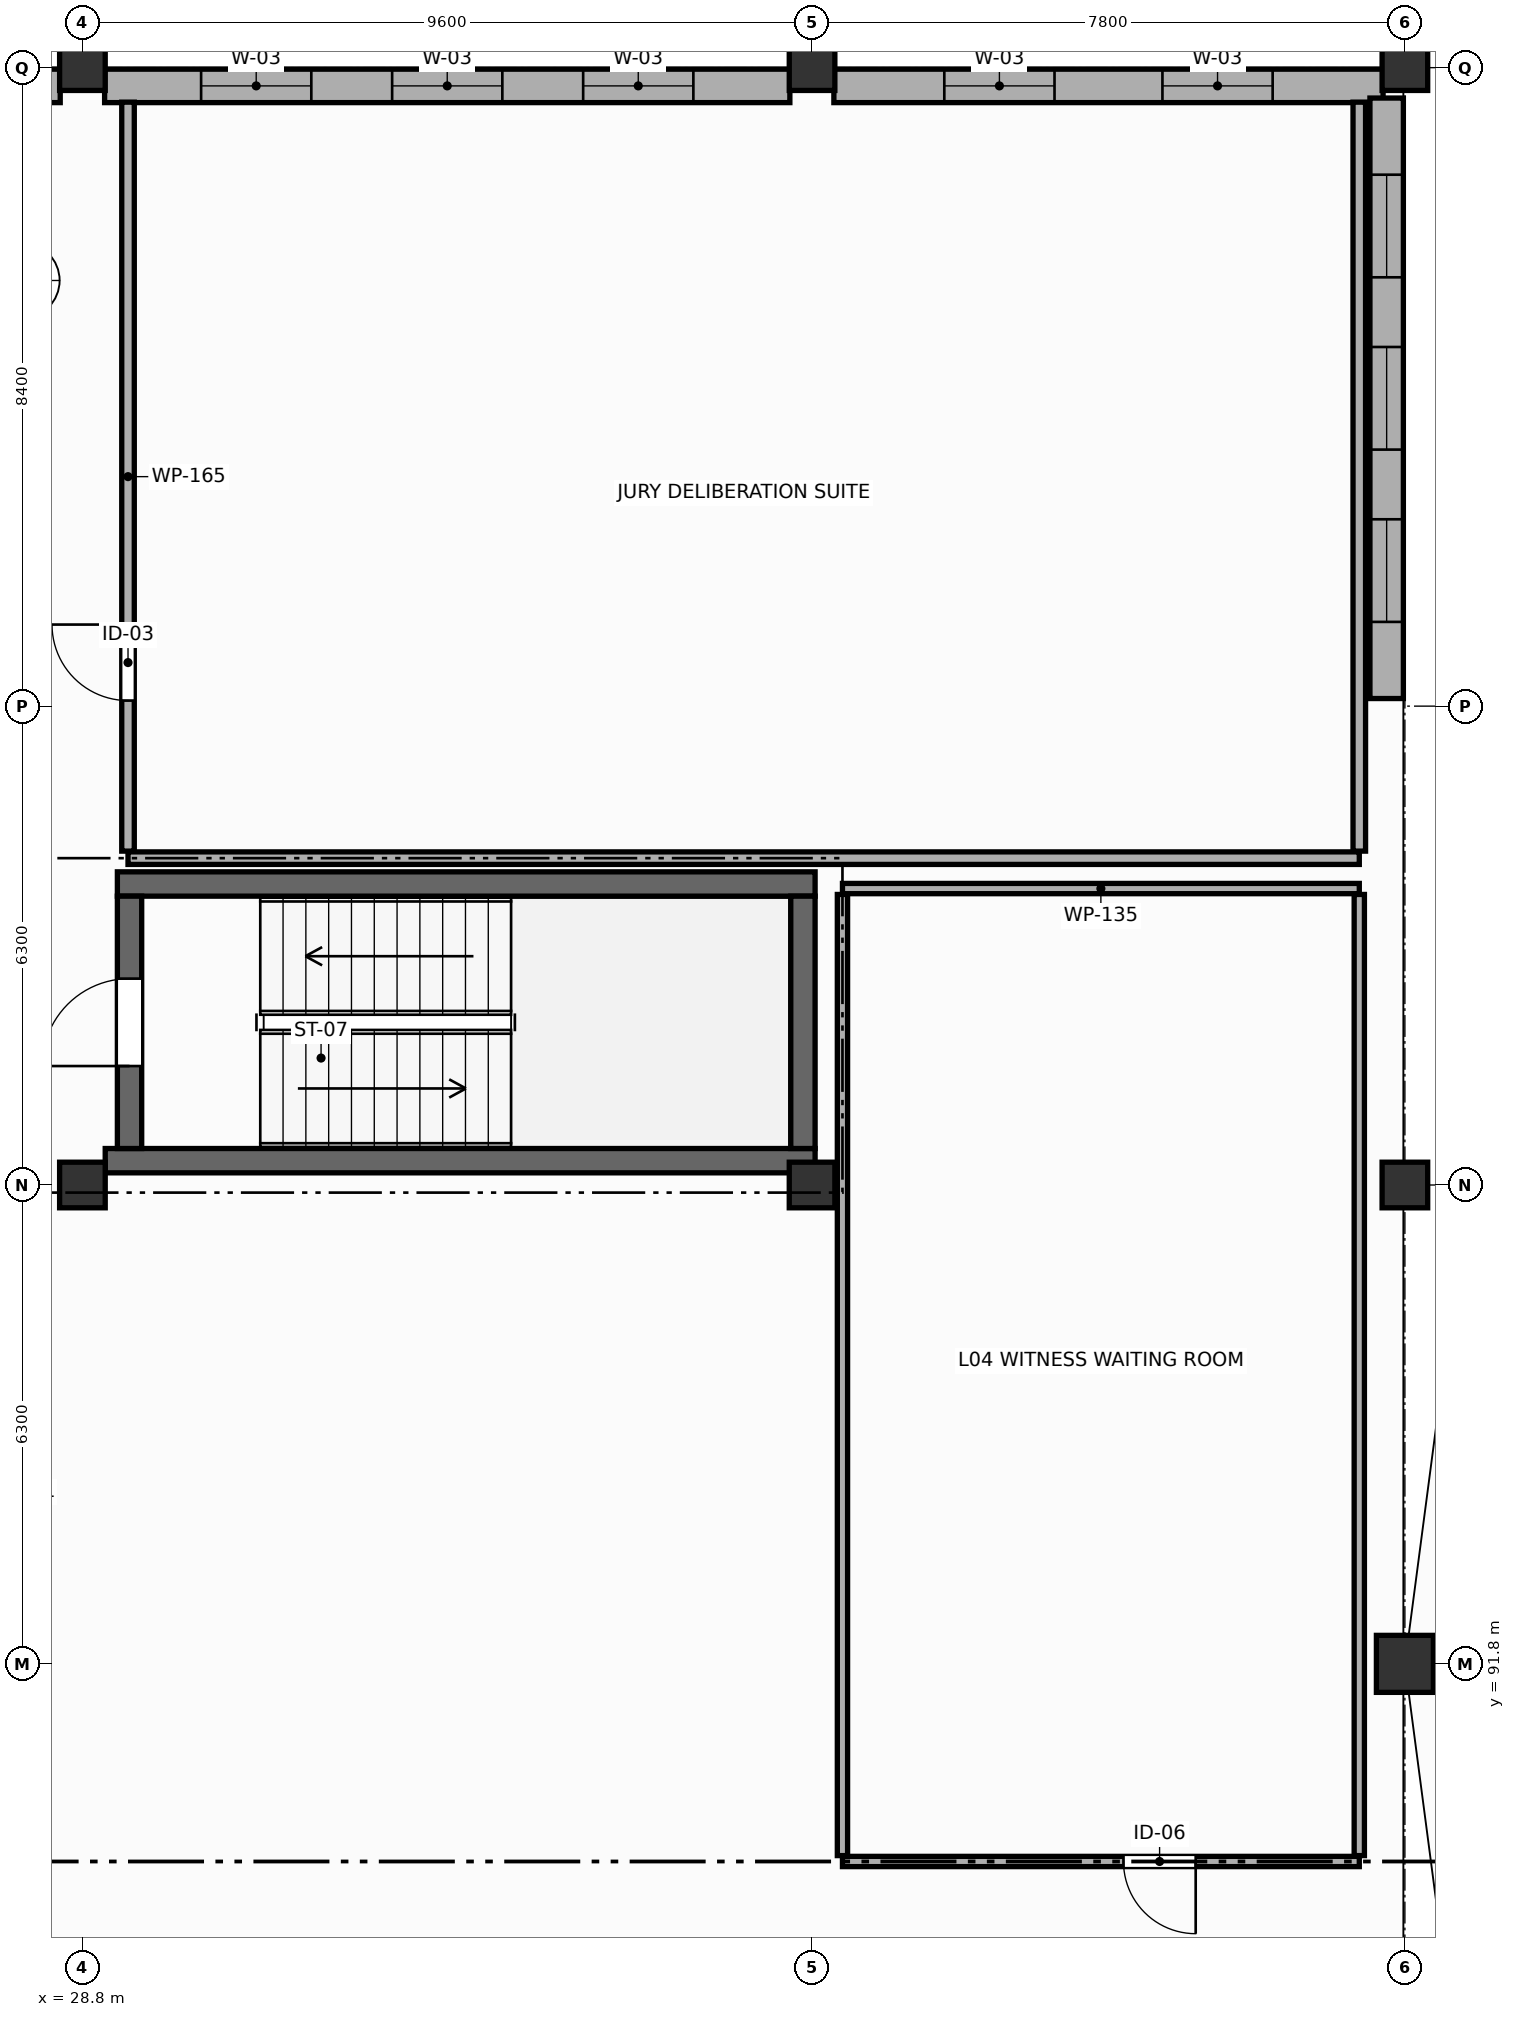
"""IFC4 building model, lengths in metres.
Left out: names, types, materials, properties, quantities, classifications, styles, units other than length and angle.
Written with IfcOpenShell. Run it as: python <this file> out.ifc"""

import sys

from ifc_helpers import new_model, si_unit, direction, frame, frame_2d, origin, origin_2d, place, context, subcontext, project, spatial, rectangle, circle, extrude, element, fill, save


model = new_model("IFC4")
c1 = context("Model", 3, precision=1e-05, world=origin(), true_north=direction((0.0, 1.0)))
c2 = subcontext(c1, "Body", "Model", "MODEL_VIEW")
j1 = project(units=[si_unit("LENGTHUNIT", "METRE"), si_unit("PLANEANGLEUNIT", "RADIAN")], contexts=[c1])
p1 = place(None, origin())
s1 = spatial("IfcSite", under=j1, at=p1, CompositionType="ELEMENT")
p2 = place(p1, origin())
s2 = spatial("IfcBuilding", under=s1, at=p2, CompositionType="ELEMENT")
p3 = place(p2, frame((0.0, 0.0, 14.4)))
s3 = spatial("IfcBuildingStorey", under=s2, at=p3, CompositionType="ELEMENT", Elevation=14.4)
p4 = place(p3, frame((46.2, 91.8, 0.0), z_axis=(0.0, 0.0, 1.0), x_axis=(1.0, 0.0, 0.0)))
e1 = element("IfcColumn", 1, at=p4, inside=s3, PredefinedType="COLUMN", context=c2, shape_type="SweptSolid", body=[
    extrude(circle(Radius=0.375, at=origin_2d()), origin(), (0.0, 0.0, 1.0), 4.2),
])
for number, where, z_axis, x_axis in (
    (2, (28.8, 98.1, 0.0), (0.0, 0.0, 1.0), (1.0, 0.0, 0.0)),
    (3, (28.8, 112.8, 0.0), (0.0, 0.0, 1.0), (1.0, 0.0, 0.0)),
    (4, (38.4, 98.1, 0.0), (0.0, 0.0, 1.0), (1.0, 0.0, 0.0)),
    (5, (38.4, 112.8, 0.0), (0.0, 0.0, 1.0), (1.0, 0.0, 0.0)),
    (6, (46.2, 98.1, 0.0), (0.0, 0.0, 1.0), (1.0, 0.0, 0.0)),
    (7, (46.2, 112.8, 0.0), (0.0, 0.0, 1.0), (1.0, 0.0, 0.0)),
):
    element("IfcColumn", number, at=place(p3, frame(where, z_axis=z_axis, x_axis=x_axis)), inside=s3, PredefinedType="COLUMN", context=c2, shape_type="SweptSolid", body=[
        extrude(rectangle(XDim=0.6, YDim=0.6, at=origin_2d()), origin(), (0.0, 0.0, 1.0), 4.2),
    ])
p5 = place(p3, frame((19.492, 112.56, 0.0), z_axis=(0.0, 0.0, 1.0), x_axis=(1.0, 0.0, 0.0)))
e8 = element("IfcWall", 8, at=p5, inside=s3, PredefinedType="STANDARD", context=c2, shape_type="SweptSolid", body=[
    extrude(rectangle(XDim=9.016, YDim=0.44, at=frame_2d((4.508, 0.0))), origin(), (0.0, 0.0, 1.0), 3.04),
])
p6 = place(p5, frame((1.27, 0.0, 0.77)))
e9 = element("IfcOpeningElement", 9, at=p6, cuts=e8, PredefinedType="OPENING", context=c2, shape_type="SweptSolid", body=[
    extrude(rectangle(XDim=1.45, YDim=2.05, at=frame_2d((0.725, 1.025))), frame((0.0, 0.23, 0.0), z_axis=(0.0, -1.0, 0.0), x_axis=(1.0, 0.0, 0.0)), (0.0, 0.0, 1.0), 0.46),
])
p7 = place(p5, frame((3.783, 0.0, 0.77)))
e10 = element("IfcOpeningElement", 10, at=p7, cuts=e8, PredefinedType="OPENING", context=c2, shape_type="SweptSolid", body=[
    extrude(rectangle(XDim=1.45, YDim=2.05, at=frame_2d((0.725, 1.025))), frame((0.0, 0.23, 0.0), z_axis=(0.0, -1.0, 0.0), x_axis=(1.0, 0.0, 0.0)), (0.0, 0.0, 1.0), 0.46),
])
p8 = place(p5, frame((6.296, 0.0, 0.77)))
e11 = element("IfcOpeningElement", 11, at=p8, cuts=e8, PredefinedType="OPENING", context=c2, shape_type="SweptSolid", body=[
    extrude(rectangle(XDim=1.45, YDim=2.05, at=frame_2d((0.725, 1.025))), frame((0.0, 0.23, 0.0), z_axis=(0.0, -1.0, 0.0), x_axis=(1.0, 0.0, 0.0)), (0.0, 0.0, 1.0), 0.46),
])
p9 = place(p3, frame((29.092, 112.56, 0.0), z_axis=(0.0, 0.0, 1.0), x_axis=(1.0, 0.0, 0.0)))
e12 = element("IfcWall", 12, at=p9, inside=s3, PredefinedType="STANDARD", context=c2, shape_type="SweptSolid", body=[
    extrude(rectangle(XDim=9.016, YDim=0.44, at=frame_2d((4.508, 0.0))), origin(), (0.0, 0.0, 1.0), 3.04),
])
p10 = place(p9, frame((1.27, 0.0, 0.77)))
e13 = element("IfcOpeningElement", 13, at=p10, cuts=e12, PredefinedType="OPENING", context=c2, shape_type="SweptSolid", body=[
    extrude(rectangle(XDim=1.45, YDim=2.05, at=frame_2d((0.725, 1.025))), frame((0.0, 0.23, 0.0), z_axis=(0.0, -1.0, 0.0), x_axis=(1.0, 0.0, 0.0)), (0.0, 0.0, 1.0), 0.46),
])
p11 = place(p9, frame((3.783, 0.0, 0.77)))
e14 = element("IfcOpeningElement", 14, at=p11, cuts=e12, PredefinedType="OPENING", context=c2, shape_type="SweptSolid", body=[
    extrude(rectangle(XDim=1.45, YDim=2.05, at=frame_2d((0.725, 1.025))), frame((0.0, 0.23, 0.0), z_axis=(0.0, -1.0, 0.0), x_axis=(1.0, 0.0, 0.0)), (0.0, 0.0, 1.0), 0.46),
])
p12 = place(p9, frame((6.296, 0.0, 0.77)))
e15 = element("IfcOpeningElement", 15, at=p12, cuts=e12, PredefinedType="OPENING", context=c2, shape_type="SweptSolid", body=[
    extrude(rectangle(XDim=1.45, YDim=2.05, at=frame_2d((0.725, 1.025))), frame((0.0, 0.23, 0.0), z_axis=(0.0, -1.0, 0.0), x_axis=(1.0, 0.0, 0.0)), (0.0, 0.0, 1.0), 0.46),
])
p13 = place(p3, frame((38.687, 112.56, 0.0), z_axis=(0.0, 0.0, 1.0), x_axis=(1.0, 0.0, 0.0)))
e16 = element("IfcWall", 16, at=p13, inside=s3, PredefinedType="STANDARD", context=c2, shape_type="SweptSolid", body=[
    extrude(rectangle(XDim=7.226, YDim=0.44, at=frame_2d((3.613, 0.0))), origin(), (0.0, 0.0, 1.0), 3.04),
])
p14 = place(p13, frame((1.453, 0.0, 0.77)))
e17 = element("IfcOpeningElement", 17, at=p14, cuts=e16, PredefinedType="OPENING", context=c2, shape_type="SweptSolid", body=[
    extrude(rectangle(XDim=1.45, YDim=2.05, at=frame_2d((0.725, 1.025))), frame((0.0, 0.23, 0.0), z_axis=(0.0, -1.0, 0.0), x_axis=(1.0, 0.0, 0.0)), (0.0, 0.0, 1.0), 0.46),
])
p15 = place(p13, frame((4.323, 0.0, 0.77)))
e18 = element("IfcOpeningElement", 18, at=p15, cuts=e16, PredefinedType="OPENING", context=c2, shape_type="SweptSolid", body=[
    extrude(rectangle(XDim=1.45, YDim=2.05, at=frame_2d((0.725, 1.025))), frame((0.0, 0.23, 0.0), z_axis=(0.0, -1.0, 0.0), x_axis=(1.0, 0.0, 0.0)), (0.0, 0.0, 1.0), 0.46),
])
p16 = place(p3, frame((45.96, 104.5, 0.0), z_axis=(0.0, 0.0, 1.0), x_axis=(0.0, 1.0, 0.0)))
e19 = element("IfcWall", 19, at=p16, inside=s3, PredefinedType="STANDARD", context=c2, shape_type="SweptSolid", body=[
    extrude(rectangle(XDim=7.9, YDim=0.44, at=frame_2d((3.95, 0.0))), origin(), (0.0, 0.0, 1.0), 3.04),
])
p17 = place(p16, frame((1.008, 0.0, 0.85)))
e20 = element("IfcOpeningElement", 20, at=p17, cuts=e19, PredefinedType="OPENING", context=c2, shape_type="SweptSolid", body=[
    extrude(rectangle(XDim=1.35, YDim=1.95, at=frame_2d((0.675, 0.975))), frame((0.0, 0.23, 0.0), z_axis=(0.0, -1.0, 0.0), x_axis=(1.0, 0.0, 0.0)), (0.0, 0.0, 1.0), 0.46),
])
p18 = place(p16, frame((3.275, 0.0, 0.85)))
e21 = element("IfcOpeningElement", 21, at=p18, cuts=e19, PredefinedType="OPENING", context=c2, shape_type="SweptSolid", body=[
    extrude(rectangle(XDim=1.35, YDim=1.95, at=frame_2d((0.675, 0.975))), frame((0.0, 0.23, 0.0), z_axis=(0.0, -1.0, 0.0), x_axis=(1.0, 0.0, 0.0)), (0.0, 0.0, 1.0), 0.46),
])
p19 = place(p16, frame((5.542, 0.0, 0.85)))
e22 = element("IfcOpeningElement", 22, at=p19, cuts=e19, PredefinedType="OPENING", context=c2, shape_type="SweptSolid", body=[
    extrude(rectangle(XDim=1.35, YDim=1.95, at=frame_2d((0.675, 0.975))), frame((0.0, 0.23, 0.0), z_axis=(0.0, -1.0, 0.0), x_axis=(1.0, 0.0, 0.0)), (0.0, 0.0, 1.0), 0.46),
])
for number, where, z_axis, x_axis in (
    (23, (46.4, 112.6, 0.235), (0.0, 0.0, 1.0), (1.0, 0.0, 0.0)),
    (24, (101.8, 104.6, 0.235), (0.0, 0.0, 1.0), (-1.0, 0.0, 0.0)),
):
    element("IfcWall", number, at=place(p3, frame(where, z_axis=z_axis, x_axis=x_axis)), inside=s3, PredefinedType="PARAPET", context=c2, shape_type="SweptSolid", body=[
        extrude(rectangle(XDim=55.4, YDim=0.265, at=frame_2d((27.7, 0.0))), origin(), (0.0, 0.0, 1.0), 1.145),
    ])
p20 = place(p3, frame((46.4, 104.95, 0.235), z_axis=(0.0, 0.0, 1.0), x_axis=(0.0, 1.0, 0.0)))
e25 = element("IfcWall", 25, at=p20, inside=s3, PredefinedType="PARAPET", context=c2, shape_type="SweptSolid", body=[
    extrude(rectangle(XDim=7.3, YDim=0.265, at=frame_2d((3.65, 0.0))), origin(), (0.0, 0.0, 1.0), 1.145),
])
p21 = place(p3, frame((29.26, 102.06, 0.0), z_axis=(0.0, 0.0, 1.0), x_axis=(1.0, 0.0, 0.0)))
e26 = element("IfcWall", 26, at=p21, inside=s3, PredefinedType="SHEAR", context=c2, shape_type="SweptSolid", body=[
    extrude(rectangle(XDim=9.18, YDim=0.32, at=frame_2d((4.59, 0.0))), origin(), (0.0, 0.0, 1.0), 3.96),
])
p22 = place(p3, frame((38.44, 98.42, 0.0), z_axis=(0.0, 0.0, 1.0), x_axis=(-1.0, 0.0, 0.0)))
e27 = element("IfcWall", 27, at=p22, inside=s3, PredefinedType="SHEAR", context=c2, shape_type="SweptSolid", body=[
    extrude(rectangle(XDim=9.34, YDim=0.32, at=frame_2d((4.67, 0.0))), origin(), (0.0, 0.0, 1.0), 3.96),
])
p23 = place(p3, frame((29.42, 98.58, 0.0), z_axis=(0.0, 0.0, 1.0), x_axis=(0.0, 1.0, 0.0)))
e28 = element("IfcWall", 28, at=p23, inside=s3, PredefinedType="SHEAR", context=c2, shape_type="SweptSolid", body=[
    extrude(rectangle(XDim=3.32, YDim=0.32, at=frame_2d((1.66, 0.0))), origin(), (0.0, 0.0, 1.0), 3.96),
])
p24 = place(p23, frame((1.085, 0.0, 0.0)))
e29 = element("IfcOpeningElement", 29, at=p24, cuts=e28, PredefinedType="OPENING", context=c2, shape_type="SweptSolid", body=[
    extrude(rectangle(XDim=1.15, YDim=2.2, at=frame_2d((0.575, 1.1))), frame((0.0, 0.17, 0.0), z_axis=(0.0, -1.0, 0.0), x_axis=(1.0, 0.0, 0.0)), (0.0, 0.0, 1.0), 0.34),
])
p25 = place(p3, frame((38.28, 101.9, 0.0), z_axis=(0.0, 0.0, 1.0), x_axis=(0.0, -1.0, 0.0)))
e30 = element("IfcWall", 30, at=p25, inside=s3, PredefinedType="SHEAR", context=c2, shape_type="SweptSolid", body=[
    extrude(rectangle(XDim=3.32, YDim=0.32, at=frame_2d((1.66, 0.0))), origin(), (0.0, 0.0, 1.0), 3.96),
])
p26 = place(p3, frame((45.6, 102.4, 0.0), z_axis=(0.0, 0.0, 1.0), x_axis=(-1.0, 0.0, 0.0)))
e31 = element("IfcWall", 31, at=p26, inside=s3, PredefinedType="PARTITIONING", context=c2, shape_type="SweptSolid", body=[
    extrude(rectangle(XDim=16.2, YDim=0.165, at=frame_2d((8.1, 0.0))), origin(), (0.0, 0.0, 1.0), 3.04),
])
p27 = place(p3, frame((29.4, 102.492, 0.0), z_axis=(0.0, 0.0, 1.0), x_axis=(0.0, 1.0, 0.0)))
e32 = element("IfcWall", 32, at=p27, inside=s3, PredefinedType="PARTITIONING", context=c2, shape_type="SweptSolid", body=[
    extrude(rectangle(XDim=9.854, YDim=0.165, at=frame_2d((4.927, 0.0))), origin(), (0.0, 0.0, 1.0), 3.34),
])
p28 = place(p27, frame((1.981, 0.0, 0.0)))
e33 = element("IfcOpeningElement", 33, at=p28, cuts=e32, PredefinedType="OPENING", context=c2, shape_type="SweptSolid", body=[
    extrude(rectangle(XDim=1.0, YDim=2.15, at=frame_2d((0.5, 1.075))), frame((0.0, 0.093, 0.0), z_axis=(0.0, -1.0, 0.0), x_axis=(1.0, 0.0, 0.0)), (0.0, 0.0, 1.0), 0.185),
])
p29 = place(p3, frame((45.6, 112.346, 0.0), z_axis=(0.0, 0.0, 1.0), x_axis=(0.0, -1.0, 0.0)))
e34 = element("IfcWall", 34, at=p29, inside=s3, PredefinedType="PARTITIONING", context=c2, shape_type="SweptSolid", body=[
    extrude(rectangle(XDim=9.854, YDim=0.165, at=frame_2d((4.927, 0.0))), origin(), (0.0, 0.0, 1.0), 3.34),
])
p30 = place(p3, frame((38.8, 102.0, 0.0), z_axis=(0.0, 0.0, 1.0), x_axis=(1.0, 0.0, 0.0)))
e35 = element("IfcWall", 35, at=p30, inside=s3, PredefinedType="PARTITIONING", context=c2, shape_type="SweptSolid", body=[
    extrude(rectangle(XDim=6.8, YDim=0.135, at=frame_2d((3.4, 0.0))), origin(), (0.0, 0.0, 1.0), 3.04),
])
p31 = place(p3, frame((45.6, 89.2, 0.0), z_axis=(0.0, 0.0, 1.0), x_axis=(-1.0, 0.0, 0.0)))
e36 = element("IfcWall", 36, at=p31, inside=s3, PredefinedType="PARTITIONING", context=c2, shape_type="SweptSolid", body=[
    extrude(rectangle(XDim=6.8, YDim=0.135, at=frame_2d((3.4, 0.0))), origin(), (0.0, 0.0, 1.0), 3.09),
])
p32 = place(p31, frame((2.153, 0.0, 0.0)))
e37 = element("IfcOpeningElement", 37, at=p32, cuts=e36, PredefinedType="OPENING", context=c2, shape_type="SweptSolid", body=[
    extrude(rectangle(XDim=0.95, YDim=2.15, at=frame_2d((0.475, 1.075))), frame((0.0, 0.077, 0.0), z_axis=(0.0, -1.0, 0.0), x_axis=(1.0, 0.0, 0.0)), (0.0, 0.0, 1.0), 0.155),
])
p33 = place(p3, frame((38.8, 89.278, 0.0), z_axis=(0.0, 0.0, 1.0), x_axis=(0.0, 1.0, 0.0)))
e38 = element("IfcWall", 38, at=p33, inside=s3, PredefinedType="PARTITIONING", context=c2, shape_type="SweptSolid", body=[
    extrude(rectangle(XDim=12.645, YDim=0.135, at=frame_2d((6.323, 0.0))), origin(), (0.0, 0.0, 1.0), 3.04),
])
p34 = place(p3, frame((45.6, 101.923, 0.0), z_axis=(0.0, 0.0, 1.0), x_axis=(0.0, -1.0, 0.0)))
e39 = element("IfcWall", 39, at=p34, inside=s3, PredefinedType="PARTITIONING", context=c2, shape_type="SweptSolid", body=[
    extrude(rectangle(XDim=12.645, YDim=0.135, at=frame_2d((6.323, 0.0))), origin(), (0.0, 0.0, 1.0), 3.34),
])
p35 = place(p10, origin())
e40 = element("IfcWindow", 40, at=p35, inside=s3, PartitioningType="SINGLE_PANEL", PredefinedType="WINDOW", context=c2, shape_type="SweptSolid", body=[
    extrude(rectangle(XDim=1.45, YDim=2.05, at=frame_2d((0.725, 1.025))), frame((0.0, 0.03, 0.0), z_axis=(0.0, -1.0, 0.0), x_axis=(1.0, 0.0, 0.0)), (0.0, 0.0, 1.0), 0.06),
])
fill(e13, e40)
p36 = place(p11, origin())
e41 = element("IfcWindow", 41, at=p36, inside=s3, PartitioningType="SINGLE_PANEL", PredefinedType="WINDOW", context=c2, shape_type="SweptSolid", body=[
    extrude(rectangle(XDim=1.45, YDim=2.05, at=frame_2d((0.725, 1.025))), frame((0.0, 0.03, 0.0), z_axis=(0.0, -1.0, 0.0), x_axis=(1.0, 0.0, 0.0)), (0.0, 0.0, 1.0), 0.06),
])
fill(e14, e41)
p37 = place(p12, origin())
e42 = element("IfcWindow", 42, at=p37, inside=s3, PartitioningType="SINGLE_PANEL", PredefinedType="WINDOW", context=c2, shape_type="SweptSolid", body=[
    extrude(rectangle(XDim=1.45, YDim=2.05, at=frame_2d((0.725, 1.025))), frame((0.0, 0.03, 0.0), z_axis=(0.0, -1.0, 0.0), x_axis=(1.0, 0.0, 0.0)), (0.0, 0.0, 1.0), 0.06),
])
fill(e15, e42)
p38 = place(p14, origin())
e43 = element("IfcWindow", 43, at=p38, inside=s3, PartitioningType="SINGLE_PANEL", PredefinedType="WINDOW", context=c2, shape_type="SweptSolid", body=[
    extrude(rectangle(XDim=1.45, YDim=2.05, at=frame_2d((0.725, 1.025))), frame((0.0, 0.03, 0.0), z_axis=(0.0, -1.0, 0.0), x_axis=(1.0, 0.0, 0.0)), (0.0, 0.0, 1.0), 0.06),
])
fill(e17, e43)
p39 = place(p15, origin())
e44 = element("IfcWindow", 44, at=p39, inside=s3, PartitioningType="SINGLE_PANEL", PredefinedType="WINDOW", context=c2, shape_type="SweptSolid", body=[
    extrude(rectangle(XDim=1.45, YDim=2.05, at=frame_2d((0.725, 1.025))), frame((0.0, 0.03, 0.0), z_axis=(0.0, -1.0, 0.0), x_axis=(1.0, 0.0, 0.0)), (0.0, 0.0, 1.0), 0.06),
])
fill(e18, e44)
p40 = place(p17, origin())
e45 = element("IfcWindow", 45, at=p40, inside=s3, PartitioningType="SINGLE_PANEL", PredefinedType="WINDOW", context=c2, shape_type="SweptSolid", body=[
    extrude(rectangle(XDim=1.35, YDim=1.95, at=frame_2d((0.675, 0.975))), frame((0.0, 0.03, 0.0), z_axis=(0.0, -1.0, 0.0), x_axis=(1.0, 0.0, 0.0)), (0.0, 0.0, 1.0), 0.06),
])
fill(e20, e45)
p41 = place(p18, origin())
e46 = element("IfcWindow", 46, at=p41, inside=s3, PartitioningType="SINGLE_PANEL", PredefinedType="WINDOW", context=c2, shape_type="SweptSolid", body=[
    extrude(rectangle(XDim=1.35, YDim=1.95, at=frame_2d((0.675, 0.975))), frame((0.0, 0.03, 0.0), z_axis=(0.0, -1.0, 0.0), x_axis=(1.0, 0.0, 0.0)), (0.0, 0.0, 1.0), 0.06),
])
fill(e21, e46)
p42 = place(p19, origin())
e47 = element("IfcWindow", 47, at=p42, inside=s3, PartitioningType="SINGLE_PANEL", PredefinedType="WINDOW", context=c2, shape_type="SweptSolid", body=[
    extrude(rectangle(XDim=1.35, YDim=1.95, at=frame_2d((0.675, 0.975))), frame((0.0, 0.03, 0.0), z_axis=(0.0, -1.0, 0.0), x_axis=(1.0, 0.0, 0.0)), (0.0, 0.0, 1.0), 0.06),
])
fill(e22, e47)
p43 = place(p24, origin())
e48 = element("IfcDoor", 48, at=p43, inside=s3, OperationType="SINGLE_SWING_LEFT", PredefinedType="DOOR", context=c2, shape_type="SweptSolid", body=[
    extrude(rectangle(XDim=1.15, YDim=2.2, at=frame_2d((0.575, 1.1))), frame((0.0, 0.025, 0.0), z_axis=(0.0, -1.0, 0.0), x_axis=(1.0, 0.0, 0.0)), (0.0, 0.0, 1.0), 0.05),
])
fill(e29, e48)
p44 = place(p28, origin())
e49 = element("IfcDoor", 49, at=p44, inside=s3, OperationType="SINGLE_SWING_RIGHT", PredefinedType="DOOR", context=c2, shape_type="SweptSolid", body=[
    extrude(rectangle(XDim=1.0, YDim=2.15, at=frame_2d((0.5, 1.075))), frame((0.0, 0.025, 0.0), z_axis=(0.0, -1.0, 0.0), x_axis=(1.0, 0.0, 0.0)), (0.0, 0.0, 1.0), 0.05),
])
fill(e33, e49)
p45 = place(p32, origin())
e50 = element("IfcDoor", 50, at=p45, inside=s3, OperationType="SINGLE_SWING_LEFT", PredefinedType="DOOR", context=c2, shape_type="SweptSolid", body=[
    extrude(rectangle(XDim=0.95, YDim=2.15, at=frame_2d((0.475, 1.075))), frame((0.0, 0.025, 0.0), z_axis=(0.0, -1.0, 0.0), x_axis=(1.0, 0.0, 0.0)), (0.0, 0.0, 1.0), 0.05),
])
fill(e37, e50)
save(model, sys.argv[1])
